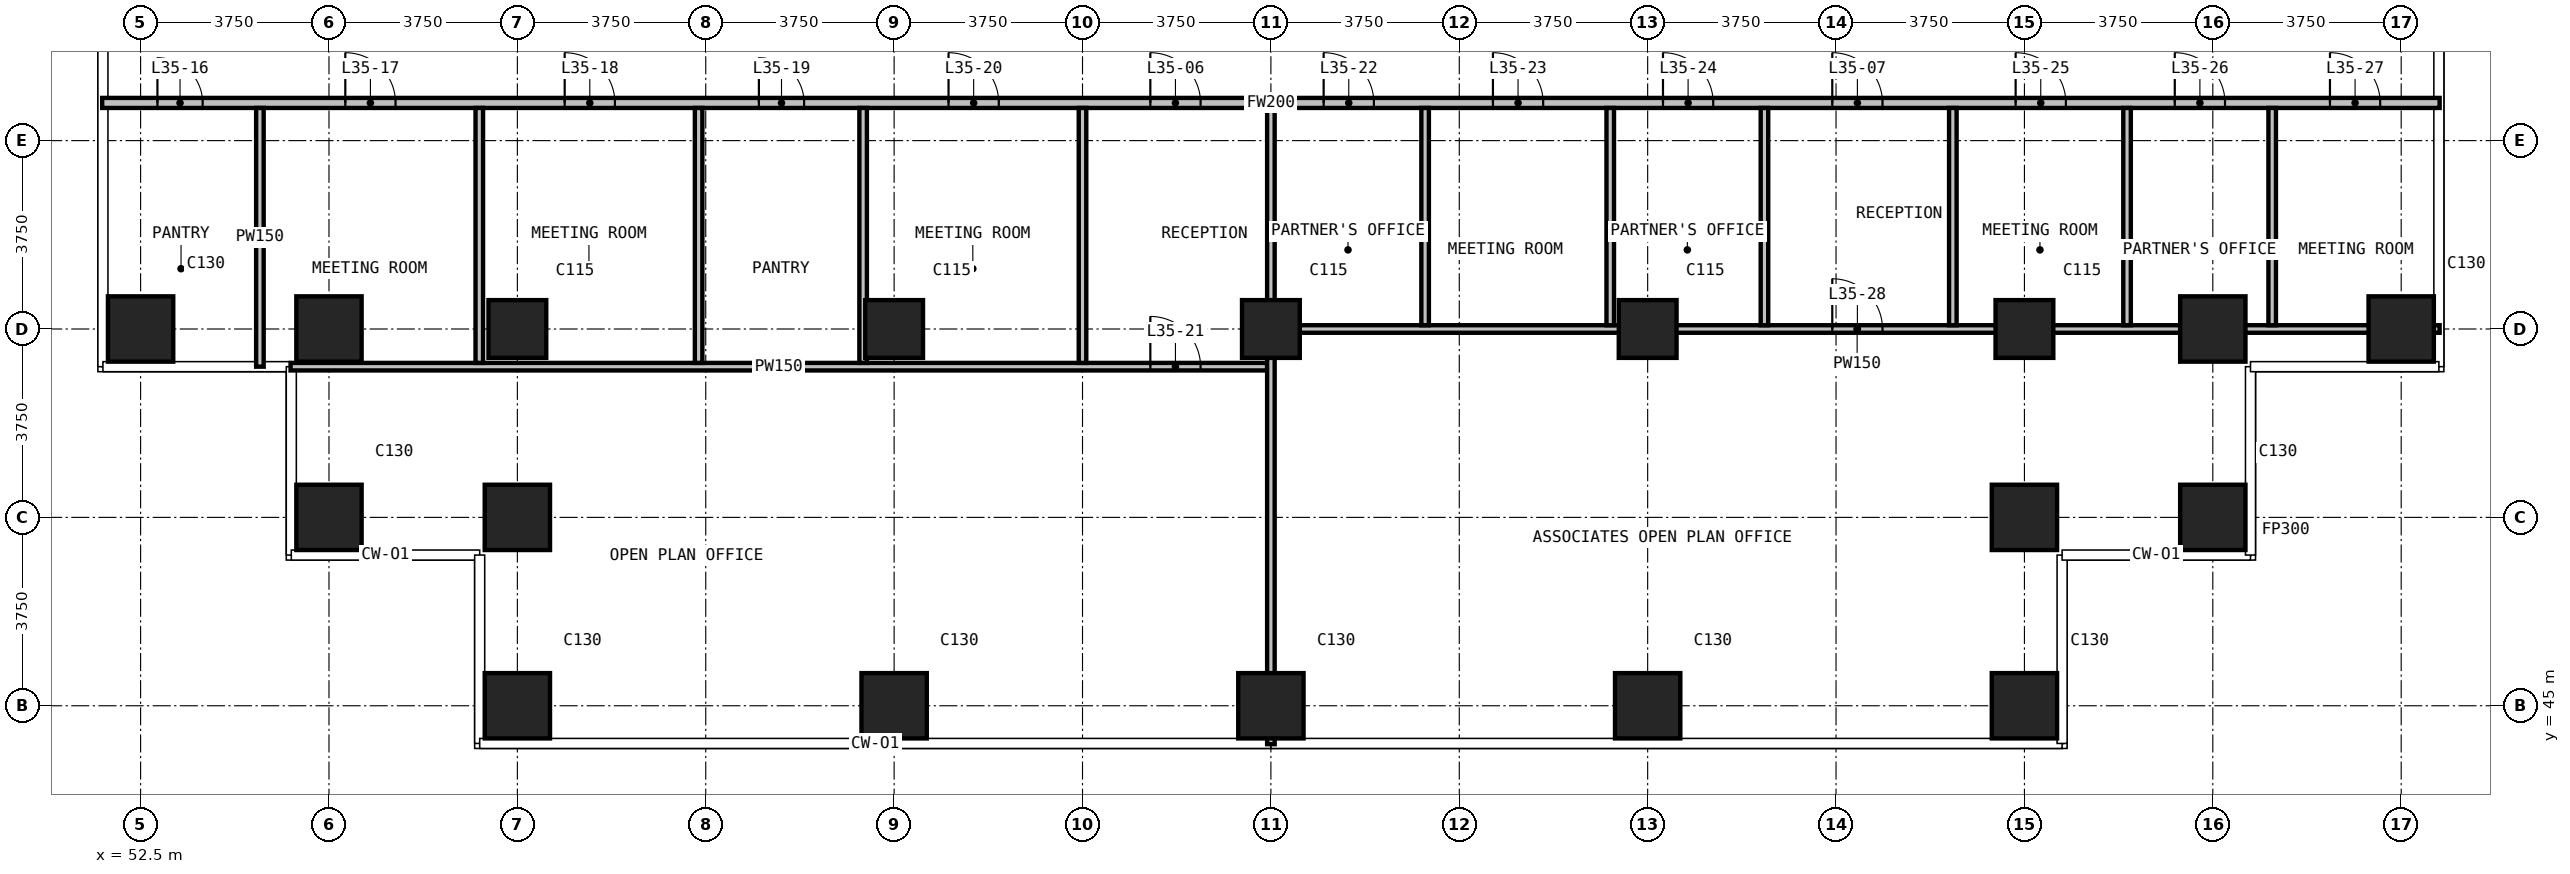
"""IFC4 building model, lengths in metres.
Left out: names, types, materials, properties, quantities, classifications, styles, units other than length and angle.
Written with IfcOpenShell. Run it as: python <this file> out.ifc"""

import sys

from ifc_helpers import new_model, si_unit, direction, frame, frame_2d, origin, origin_2d, place, context, subcontext, project, spatial, rectangle, extrude, element, fill, save


model = new_model("IFC4")
c1 = context("Model", 3, precision=1e-05, world=origin(), true_north=direction((0.0, 1.0)))
c2 = subcontext(c1, "Body", "Model", "MODEL_VIEW")
j1 = project(units=[si_unit("LENGTHUNIT", "METRE"), si_unit("PLANEANGLEUNIT", "RADIAN")], contexts=[c1])
p1 = place(None, origin())
s1 = spatial("IfcSite", under=j1, at=p1, CompositionType="ELEMENT")
p2 = place(p1, origin())
s2 = spatial("IfcBuilding", under=s1, at=p2, CompositionType="ELEMENT")
p3 = place(p2, frame((0.0, 0.0, 139.6)))
s3 = spatial("IfcBuildingStorey", under=s2, at=p3, CompositionType="ELEMENT", Elevation=139.6)
for number, where, z_axis, x_axis in (
    (1, (52.5, 52.5, 0.0), (0.0, 0.0, 1.0), (1.0, 0.0, 0.0)),
    (2, (56.25, 48.75, 0.0), (0.0, 0.0, 1.0), (1.0, 0.0, 0.0)),
    (3, (56.25, 52.5, 0.0), (0.0, 0.0, 1.0), (1.0, 0.0, 0.0)),
    (4, (60.0, 45.0, 0.0), (0.0, 0.0, 1.0), (1.0, 0.0, 0.0)),
    (5, (60.0, 48.75, 0.0), (0.0, 0.0, 1.0), (1.0, 0.0, 0.0)),
):
    element("IfcColumn", number, at=place(p3, frame(where, z_axis=z_axis, x_axis=x_axis)), inside=s3, PredefinedType="COLUMN", context=c2, shape_type="SweptSolid", body=[
        extrude(rectangle(XDim=1.3, YDim=1.3, at=origin_2d()), origin(), (0.0, 0.0, 1.0), 3.6),
    ])
p4 = place(p3, frame((60.0, 52.5, 0.0), z_axis=(0.0, 0.0, 1.0), x_axis=(1.0, 0.0, 0.0)))
e6 = element("IfcColumn", 6, at=p4, inside=s3, PredefinedType="COLUMN", context=c2, shape_type="SweptSolid", body=[
    extrude(rectangle(XDim=1.15, YDim=1.15, at=origin_2d()), origin(), (0.0, 0.0, 1.0), 3.6),
])
p5 = place(p3, frame((67.5, 45.0, 0.0), z_axis=(0.0, 0.0, 1.0), x_axis=(1.0, 0.0, 0.0)))
e7 = element("IfcColumn", 7, at=p5, inside=s3, PredefinedType="COLUMN", context=c2, shape_type="SweptSolid", body=[
    extrude(rectangle(XDim=1.3, YDim=1.3, at=origin_2d()), origin(), (0.0, 0.0, 1.0), 3.6),
])
p6 = place(p3, frame((67.5, 52.5, 0.0), z_axis=(0.0, 0.0, 1.0), x_axis=(1.0, 0.0, 0.0)))
e8 = element("IfcColumn", 8, at=p6, inside=s3, PredefinedType="COLUMN", context=c2, shape_type="SweptSolid", body=[
    extrude(rectangle(XDim=1.15, YDim=1.15, at=origin_2d()), origin(), (0.0, 0.0, 1.0), 3.6),
])
p7 = place(p3, frame((75.0, 45.0, 0.0), z_axis=(0.0, 0.0, 1.0), x_axis=(1.0, 0.0, 0.0)))
e9 = element("IfcColumn", 9, at=p7, inside=s3, PredefinedType="COLUMN", context=c2, shape_type="SweptSolid", body=[
    extrude(rectangle(XDim=1.3, YDim=1.3, at=origin_2d()), origin(), (0.0, 0.0, 1.0), 3.6),
])
p8 = place(p3, frame((75.0, 52.5, 0.0), z_axis=(0.0, 0.0, 1.0), x_axis=(1.0, 0.0, 0.0)))
e10 = element("IfcColumn", 10, at=p8, inside=s3, PredefinedType="COLUMN", context=c2, shape_type="SweptSolid", body=[
    extrude(rectangle(XDim=1.15, YDim=1.15, at=origin_2d()), origin(), (0.0, 0.0, 1.0), 3.6),
])
p9 = place(p3, frame((82.5, 45.0, 0.0), z_axis=(0.0, 0.0, 1.0), x_axis=(1.0, 0.0, 0.0)))
e11 = element("IfcColumn", 11, at=p9, inside=s3, PredefinedType="COLUMN", context=c2, shape_type="SweptSolid", body=[
    extrude(rectangle(XDim=1.3, YDim=1.3, at=origin_2d()), origin(), (0.0, 0.0, 1.0), 3.6),
])
p10 = place(p3, frame((82.5, 52.5, 0.0), z_axis=(0.0, 0.0, 1.0), x_axis=(1.0, 0.0, 0.0)))
e12 = element("IfcColumn", 12, at=p10, inside=s3, PredefinedType="COLUMN", context=c2, shape_type="SweptSolid", body=[
    extrude(rectangle(XDim=1.15, YDim=1.15, at=origin_2d()), origin(), (0.0, 0.0, 1.0), 3.6),
])
for number, where, z_axis, x_axis in (
    (13, (90.0, 45.0, 0.0), (0.0, 0.0, 1.0), (1.0, 0.0, 0.0)),
    (14, (90.0, 48.75, 0.0), (0.0, 0.0, 1.0), (1.0, 0.0, 0.0)),
):
    element("IfcColumn", number, at=place(p3, frame(where, z_axis=z_axis, x_axis=x_axis)), inside=s3, PredefinedType="COLUMN", context=c2, shape_type="SweptSolid", body=[
        extrude(rectangle(XDim=1.3, YDim=1.3, at=origin_2d()), origin(), (0.0, 0.0, 1.0), 3.6),
    ])
p11 = place(p3, frame((90.0, 52.5, 0.0), z_axis=(0.0, 0.0, 1.0), x_axis=(1.0, 0.0, 0.0)))
e15 = element("IfcColumn", 15, at=p11, inside=s3, PredefinedType="COLUMN", context=c2, shape_type="SweptSolid", body=[
    extrude(rectangle(XDim=1.15, YDim=1.15, at=origin_2d()), origin(), (0.0, 0.0, 1.0), 3.6),
])
for number, where, z_axis, x_axis in (
    (16, (93.75, 48.75, 0.0), (0.0, 0.0, 1.0), (1.0, 0.0, 0.0)),
    (17, (93.75, 52.5, 0.0), (0.0, 0.0, 1.0), (1.0, 0.0, 0.0)),
    (18, (97.5, 52.5, 0.0), (0.0, 0.0, 1.0), (1.0, 0.0, 0.0)),
):
    element("IfcColumn", number, at=place(p3, frame(where, z_axis=z_axis, x_axis=x_axis)), inside=s3, PredefinedType="COLUMN", context=c2, shape_type="SweptSolid", body=[
        extrude(rectangle(XDim=1.3, YDim=1.3, at=origin_2d()), origin(), (0.0, 0.0, 1.0), 3.6),
    ])
p12 = place(p3, frame((51.735, 57.0, 0.0), z_axis=(0.0, 0.0, 1.0), x_axis=(1.0, 0.0, 0.0)))
e19 = element("IfcWall", 19, at=p12, inside=s3, PredefinedType="PARTITIONING", context=c2, shape_type="SweptSolid", body=[
    extrude(rectangle(XDim=46.53, YDim=0.2, at=frame_2d((23.265, 0.0))), origin(), (0.0, 0.0, 1.0), 3.3),
])
p13 = place(p12, frame((20.865, 0.0, 0.0)))
e20 = element("IfcOpeningElement", 20, at=p13, cuts=e19, PredefinedType="OPENING", context=c2, shape_type="SweptSolid", body=[
    extrude(rectangle(XDim=1.0, YDim=2.2, at=frame_2d((0.5, 1.1))), frame((0.0, 0.11, 0.0), z_axis=(0.0, -1.0, 0.0), x_axis=(1.0, 0.0, 0.0)), (0.0, 0.0, 1.0), 0.22),
])
p14 = place(p12, frame((34.44, 0.0, 0.0)))
e21 = element("IfcOpeningElement", 21, at=p14, cuts=e19, PredefinedType="OPENING", context=c2, shape_type="SweptSolid", body=[
    extrude(rectangle(XDim=1.0, YDim=2.2, at=frame_2d((0.5, 1.1))), frame((0.0, 0.11, 0.0), z_axis=(0.0, -1.0, 0.0), x_axis=(1.0, 0.0, 0.0)), (0.0, 0.0, 1.0), 0.22),
])
p15 = place(p12, frame((1.1, 0.0, 0.0)))
e22 = element("IfcOpeningElement", 22, at=p15, cuts=e19, PredefinedType="OPENING", context=c2, shape_type="SweptSolid", body=[
    extrude(rectangle(XDim=0.9, YDim=2.2, at=frame_2d((0.45, 1.1))), frame((0.0, 0.11, 0.0), z_axis=(0.0, -1.0, 0.0), x_axis=(1.0, 0.0, 0.0)), (0.0, 0.0, 1.0), 0.22),
])
p16 = place(p12, frame((4.84, 0.0, 0.0)))
e23 = element("IfcOpeningElement", 23, at=p16, cuts=e19, PredefinedType="OPENING", context=c2, shape_type="SweptSolid", body=[
    extrude(rectangle(XDim=1.0, YDim=2.2, at=frame_2d((0.5, 1.1))), frame((0.0, 0.11, 0.0), z_axis=(0.0, -1.0, 0.0), x_axis=(1.0, 0.0, 0.0)), (0.0, 0.0, 1.0), 0.22),
])
p17 = place(p12, frame((9.207, 0.0, 0.0)))
e24 = element("IfcOpeningElement", 24, at=p17, cuts=e19, PredefinedType="OPENING", context=c2, shape_type="SweptSolid", body=[
    extrude(rectangle(XDim=1.0, YDim=2.2, at=frame_2d((0.5, 1.1))), frame((0.0, 0.11, 0.0), z_axis=(0.0, -1.0, 0.0), x_axis=(1.0, 0.0, 0.0)), (0.0, 0.0, 1.0), 0.22),
])
p18 = place(p12, frame((13.073, 0.0, 0.0)))
e25 = element("IfcOpeningElement", 25, at=p18, cuts=e19, PredefinedType="OPENING", context=c2, shape_type="SweptSolid", body=[
    extrude(rectangle(XDim=0.9, YDim=2.2, at=frame_2d((0.45, 1.1))), frame((0.0, 0.11, 0.0), z_axis=(0.0, -1.0, 0.0), x_axis=(1.0, 0.0, 0.0)), (0.0, 0.0, 1.0), 0.22),
])
p19 = place(p12, frame((16.848, 0.0, 0.0)))
e26 = element("IfcOpeningElement", 26, at=p19, cuts=e19, PredefinedType="OPENING", context=c2, shape_type="SweptSolid", body=[
    extrude(rectangle(XDim=1.0, YDim=2.2, at=frame_2d((0.5, 1.1))), frame((0.0, 0.11, 0.0), z_axis=(0.0, -1.0, 0.0), x_axis=(1.0, 0.0, 0.0)), (0.0, 0.0, 1.0), 0.22),
])
p20 = place(p12, frame((24.315, 0.0, 0.0)))
e27 = element("IfcOpeningElement", 27, at=p20, cuts=e19, PredefinedType="OPENING", context=c2, shape_type="SweptSolid", body=[
    extrude(rectangle(XDim=1.0, YDim=2.2, at=frame_2d((0.5, 1.1))), frame((0.0, 0.11, 0.0), z_axis=(0.0, -1.0, 0.0), x_axis=(1.0, 0.0, 0.0)), (0.0, 0.0, 1.0), 0.22),
])
p21 = place(p12, frame((27.685, 0.0, 0.0)))
e28 = element("IfcOpeningElement", 28, at=p21, cuts=e19, PredefinedType="OPENING", context=c2, shape_type="SweptSolid", body=[
    extrude(rectangle(XDim=1.0, YDim=2.2, at=frame_2d((0.5, 1.1))), frame((0.0, 0.11, 0.0), z_axis=(0.0, -1.0, 0.0), x_axis=(1.0, 0.0, 0.0)), (0.0, 0.0, 1.0), 0.22),
])
p22 = place(p12, frame((31.07, 0.0, 0.0)))
e29 = element("IfcOpeningElement", 29, at=p22, cuts=e19, PredefinedType="OPENING", context=c2, shape_type="SweptSolid", body=[
    extrude(rectangle(XDim=1.0, YDim=2.2, at=frame_2d((0.5, 1.1))), frame((0.0, 0.11, 0.0), z_axis=(0.0, -1.0, 0.0), x_axis=(1.0, 0.0, 0.0)), (0.0, 0.0, 1.0), 0.22),
])
p23 = place(p12, frame((38.09, 0.0, 0.0)))
e30 = element("IfcOpeningElement", 30, at=p23, cuts=e19, PredefinedType="OPENING", context=c2, shape_type="SweptSolid", body=[
    extrude(rectangle(XDim=1.0, YDim=2.2, at=frame_2d((0.5, 1.1))), frame((0.0, 0.11, 0.0), z_axis=(0.0, -1.0, 0.0), x_axis=(1.0, 0.0, 0.0)), (0.0, 0.0, 1.0), 0.22),
])
p24 = place(p12, frame((41.258, 0.0, 0.0)))
e31 = element("IfcOpeningElement", 31, at=p24, cuts=e19, PredefinedType="OPENING", context=c2, shape_type="SweptSolid", body=[
    extrude(rectangle(XDim=1.0, YDim=2.2, at=frame_2d((0.5, 1.1))), frame((0.0, 0.11, 0.0), z_axis=(0.0, -1.0, 0.0), x_axis=(1.0, 0.0, 0.0)), (0.0, 0.0, 1.0), 0.22),
])
p25 = place(p12, frame((44.347, 0.0, 0.0)))
e32 = element("IfcOpeningElement", 32, at=p25, cuts=e19, PredefinedType="OPENING", context=c2, shape_type="SweptSolid", body=[
    extrude(rectangle(XDim=1.0, YDim=2.2, at=frame_2d((0.5, 1.1))), frame((0.0, 0.11, 0.0), z_axis=(0.0, -1.0, 0.0), x_axis=(1.0, 0.0, 0.0)), (0.0, 0.0, 1.0), 0.22),
])
p26 = place(p3, frame((55.485, 51.75, 0.0), z_axis=(0.0, 0.0, 1.0), x_axis=(1.0, 0.0, 0.0)))
e33 = element("IfcWall", 33, at=p26, inside=s3, PredefinedType="PARTITIONING", context=c2, shape_type="SweptSolid", body=[
    extrude(rectangle(XDim=19.44, YDim=0.15, at=frame_2d((9.72, 0.0))), origin(), (0.0, 0.0, 1.0), 3.3),
])
p27 = place(p26, frame((17.115, 0.0, 0.0)))
e34 = element("IfcOpeningElement", 34, at=p27, cuts=e33, PredefinedType="OPENING", context=c2, shape_type="SweptSolid", body=[
    extrude(rectangle(XDim=1.0, YDim=2.2, at=frame_2d((0.5, 1.1))), frame((0.0, 0.085, 0.0), z_axis=(0.0, -1.0, 0.0), x_axis=(1.0, 0.0, 0.0)), (0.0, 0.0, 1.0), 0.17),
])
p28 = place(p3, frame((75.075, 52.5, 0.0), z_axis=(0.0, 0.0, 1.0), x_axis=(1.0, 0.0, 0.0)))
e35 = element("IfcWall", 35, at=p28, inside=s3, PredefinedType="PARTITIONING", context=c2, shape_type="SweptSolid", body=[
    extrude(rectangle(XDim=23.19, YDim=0.15, at=frame_2d((11.595, 0.0))), origin(), (0.0, 0.0, 1.0), 3.3),
])
p29 = place(p28, frame((11.1, 0.0, 0.0)))
e36 = element("IfcOpeningElement", 36, at=p29, cuts=e35, PredefinedType="OPENING", context=c2, shape_type="SweptSolid", body=[
    extrude(rectangle(XDim=1.0, YDim=2.2, at=frame_2d((0.5, 1.1))), frame((0.0, 0.085, 0.0), z_axis=(0.0, -1.0, 0.0), x_axis=(1.0, 0.0, 0.0)), (0.0, 0.0, 1.0), 0.17),
])
p30 = place(p3, frame((54.875, 51.75, 0.0), z_axis=(0.0, 0.0, 1.0), x_axis=(0.0, 1.0, 0.0)))
e37 = element("IfcWall", 37, at=p30, inside=s3, PredefinedType="PARTITIONING", context=c2, shape_type="SweptSolid", body=[
    extrude(rectangle(XDim=5.15, YDim=0.15, at=frame_2d((2.575, 0.0))), origin(), (0.0, 0.0, 1.0), 3.3),
])
for number, where, z_axis, x_axis in (
    (38, (59.242, 51.825, 0.0), (0.0, 0.0, 1.0), (0.0, 1.0, 0.0)),
    (39, (63.608, 51.825, 0.0), (0.0, 0.0, 1.0), (0.0, 1.0, 0.0)),
    (40, (66.883, 51.825, 0.0), (0.0, 0.0, 1.0), (0.0, 1.0, 0.0)),
    (41, (71.25, 51.825, 0.0), (0.0, 0.0, 1.0), (0.0, 1.0, 0.0)),
):
    element("IfcWall", number, at=place(p3, frame(where, z_axis=z_axis, x_axis=x_axis)), inside=s3, PredefinedType="PARTITIONING", context=c2, shape_type="SweptSolid", body=[
        extrude(rectangle(XDim=5.075, YDim=0.15, at=frame_2d((2.538, 0.0))), origin(), (0.0, 0.0, 1.0), 3.3),
    ])
p31 = place(p3, frame((75.0, 44.235, 0.0), z_axis=(0.0, 0.0, 1.0), x_axis=(0.0, 1.0, 0.0)))
e42 = element("IfcWall", 42, at=p31, inside=s3, PredefinedType="PARTITIONING", context=c2, shape_type="SweptSolid", body=[
    extrude(rectangle(XDim=12.665, YDim=0.15, at=frame_2d((6.333, 0.0))), origin(), (0.0, 0.0, 1.0), 3.3),
])
for number, where, z_axis, x_axis in (
    (43, (78.07, 52.575, 0.0), (0.0, 0.0, 1.0), (0.0, 1.0, 0.0)),
    (44, (81.755, 52.575, 0.0), (0.0, 0.0, 1.0), (0.0, 1.0, 0.0)),
    (45, (84.825, 52.575, 0.0), (0.0, 0.0, 1.0), (0.0, 1.0, 0.0)),
    (46, (88.575, 52.575, 0.0), (0.0, 0.0, 1.0), (0.0, 1.0, 0.0)),
    (47, (92.043, 52.575, 0.0), (0.0, 0.0, 1.0), (0.0, 1.0, 0.0)),
    (48, (94.932, 52.575, 0.0), (0.0, 0.0, 1.0), (0.0, 1.0, 0.0)),
):
    element("IfcWall", number, at=place(p3, frame(where, z_axis=z_axis, x_axis=x_axis)), inside=s3, PredefinedType="PARTITIONING", context=c2, shape_type="SweptSolid", body=[
        extrude(rectangle(XDim=4.325, YDim=0.15, at=frame_2d((2.163, 0.0))), origin(), (0.0, 0.0, 1.0), 3.3),
    ])
p32 = place(p13, origin())
e49 = element("IfcDoor", 49, at=p32, inside=s3, OperationType="SINGLE_SWING_RIGHT", PredefinedType="DOOR", context=c2, shape_type="SweptSolid", body=[
    extrude(rectangle(XDim=1.0, YDim=2.2, at=frame_2d((0.5, 1.1))), frame((0.0, 0.025, 0.0), z_axis=(0.0, -1.0, 0.0), x_axis=(1.0, 0.0, 0.0)), (0.0, 0.0, 1.0), 0.05),
])
fill(e20, e49)
p33 = place(p14, origin())
e50 = element("IfcDoor", 50, at=p33, inside=s3, OperationType="SINGLE_SWING_LEFT", PredefinedType="DOOR", context=c2, shape_type="SweptSolid", body=[
    extrude(rectangle(XDim=1.0, YDim=2.2, at=frame_2d((0.5, 1.1))), frame((0.0, 0.025, 0.0), z_axis=(0.0, -1.0, 0.0), x_axis=(1.0, 0.0, 0.0)), (0.0, 0.0, 1.0), 0.05),
])
fill(e21, e50)
p34 = place(p15, origin())
e51 = element("IfcDoor", 51, at=p34, inside=s3, OperationType="SINGLE_SWING_LEFT", PredefinedType="DOOR", context=c2, shape_type="SweptSolid", body=[
    extrude(rectangle(XDim=0.9, YDim=2.2, at=frame_2d((0.45, 1.1))), frame((0.0, 0.025, 0.0), z_axis=(0.0, -1.0, 0.0), x_axis=(1.0, 0.0, 0.0)), (0.0, 0.0, 1.0), 0.05),
])
fill(e22, e51)
p35 = place(p16, origin())
e52 = element("IfcDoor", 52, at=p35, inside=s3, OperationType="SINGLE_SWING_RIGHT", PredefinedType="DOOR", context=c2, shape_type="SweptSolid", body=[
    extrude(rectangle(XDim=1.0, YDim=2.2, at=frame_2d((0.5, 1.1))), frame((0.0, 0.025, 0.0), z_axis=(0.0, -1.0, 0.0), x_axis=(1.0, 0.0, 0.0)), (0.0, 0.0, 1.0), 0.05),
])
fill(e23, e52)
p36 = place(p17, origin())
e53 = element("IfcDoor", 53, at=p36, inside=s3, OperationType="SINGLE_SWING_RIGHT", PredefinedType="DOOR", context=c2, shape_type="SweptSolid", body=[
    extrude(rectangle(XDim=1.0, YDim=2.2, at=frame_2d((0.5, 1.1))), frame((0.0, 0.025, 0.0), z_axis=(0.0, -1.0, 0.0), x_axis=(1.0, 0.0, 0.0)), (0.0, 0.0, 1.0), 0.05),
])
fill(e24, e53)
p37 = place(p18, origin())
e54 = element("IfcDoor", 54, at=p37, inside=s3, OperationType="SINGLE_SWING_RIGHT", PredefinedType="DOOR", context=c2, shape_type="SweptSolid", body=[
    extrude(rectangle(XDim=0.9, YDim=2.2, at=frame_2d((0.45, 1.1))), frame((0.0, 0.025, 0.0), z_axis=(0.0, -1.0, 0.0), x_axis=(1.0, 0.0, 0.0)), (0.0, 0.0, 1.0), 0.05),
])
fill(e25, e54)
p38 = place(p19, origin())
e55 = element("IfcDoor", 55, at=p38, inside=s3, OperationType="SINGLE_SWING_LEFT", PredefinedType="DOOR", context=c2, shape_type="SweptSolid", body=[
    extrude(rectangle(XDim=1.0, YDim=2.2, at=frame_2d((0.5, 1.1))), frame((0.0, 0.025, 0.0), z_axis=(0.0, -1.0, 0.0), x_axis=(1.0, 0.0, 0.0)), (0.0, 0.0, 1.0), 0.05),
])
fill(e26, e55)
p39 = place(p27, origin())
e56 = element("IfcDoor", 56, at=p39, inside=s3, OperationType="SINGLE_SWING_LEFT", PredefinedType="DOOR", context=c2, shape_type="SweptSolid", body=[
    extrude(rectangle(XDim=1.0, YDim=2.2, at=frame_2d((0.5, 1.1))), frame((0.0, 0.025, 0.0), z_axis=(0.0, -1.0, 0.0), x_axis=(1.0, 0.0, 0.0)), (0.0, 0.0, 1.0), 0.05),
])
fill(e34, e56)
p40 = place(p20, origin())
e57 = element("IfcDoor", 57, at=p40, inside=s3, OperationType="SINGLE_SWING_LEFT", PredefinedType="DOOR", context=c2, shape_type="SweptSolid", body=[
    extrude(rectangle(XDim=1.0, YDim=2.2, at=frame_2d((0.5, 1.1))), frame((0.0, 0.025, 0.0), z_axis=(0.0, -1.0, 0.0), x_axis=(1.0, 0.0, 0.0)), (0.0, 0.0, 1.0), 0.05),
])
fill(e27, e57)
p41 = place(p21, origin())
e58 = element("IfcDoor", 58, at=p41, inside=s3, OperationType="SINGLE_SWING_LEFT", PredefinedType="DOOR", context=c2, shape_type="SweptSolid", body=[
    extrude(rectangle(XDim=1.0, YDim=2.2, at=frame_2d((0.5, 1.1))), frame((0.0, 0.025, 0.0), z_axis=(0.0, -1.0, 0.0), x_axis=(1.0, 0.0, 0.0)), (0.0, 0.0, 1.0), 0.05),
])
fill(e28, e58)
p42 = place(p22, origin())
e59 = element("IfcDoor", 59, at=p42, inside=s3, OperationType="SINGLE_SWING_RIGHT", PredefinedType="DOOR", context=c2, shape_type="SweptSolid", body=[
    extrude(rectangle(XDim=1.0, YDim=2.2, at=frame_2d((0.5, 1.1))), frame((0.0, 0.025, 0.0), z_axis=(0.0, -1.0, 0.0), x_axis=(1.0, 0.0, 0.0)), (0.0, 0.0, 1.0), 0.05),
])
fill(e29, e59)
p43 = place(p23, origin())
e60 = element("IfcDoor", 60, at=p43, inside=s3, OperationType="SINGLE_SWING_LEFT", PredefinedType="DOOR", context=c2, shape_type="SweptSolid", body=[
    extrude(rectangle(XDim=1.0, YDim=2.2, at=frame_2d((0.5, 1.1))), frame((0.0, 0.025, 0.0), z_axis=(0.0, -1.0, 0.0), x_axis=(1.0, 0.0, 0.0)), (0.0, 0.0, 1.0), 0.05),
])
fill(e30, e60)
p44 = place(p24, origin())
e61 = element("IfcDoor", 61, at=p44, inside=s3, OperationType="SINGLE_SWING_LEFT", PredefinedType="DOOR", context=c2, shape_type="SweptSolid", body=[
    extrude(rectangle(XDim=1.0, YDim=2.2, at=frame_2d((0.5, 1.1))), frame((0.0, 0.025, 0.0), z_axis=(0.0, -1.0, 0.0), x_axis=(1.0, 0.0, 0.0)), (0.0, 0.0, 1.0), 0.05),
])
fill(e31, e61)
p45 = place(p25, origin())
e62 = element("IfcDoor", 62, at=p45, inside=s3, OperationType="SINGLE_SWING_LEFT", PredefinedType="DOOR", context=c2, shape_type="SweptSolid", body=[
    extrude(rectangle(XDim=1.0, YDim=2.2, at=frame_2d((0.5, 1.1))), frame((0.0, 0.025, 0.0), z_axis=(0.0, -1.0, 0.0), x_axis=(1.0, 0.0, 0.0)), (0.0, 0.0, 1.0), 0.05),
])
fill(e32, e62)
p46 = place(p29, origin())
e63 = element("IfcDoor", 63, at=p46, inside=s3, OperationType="SINGLE_SWING_LEFT", PredefinedType="DOOR", context=c2, shape_type="SweptSolid", body=[
    extrude(rectangle(XDim=1.0, YDim=2.2, at=frame_2d((0.5, 1.1))), frame((0.0, 0.025, 0.0), z_axis=(0.0, -1.0, 0.0), x_axis=(1.0, 0.0, 0.0)), (0.0, 0.0, 1.0), 0.05),
])
fill(e36, e63)
save(model, sys.argv[1])
